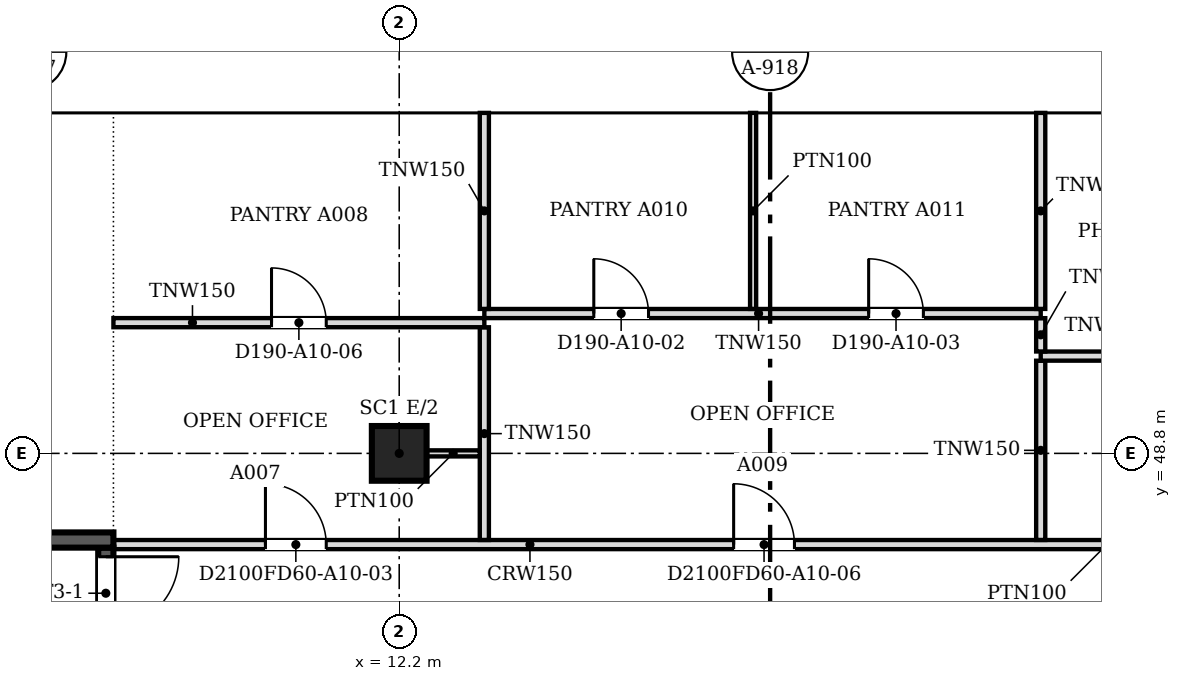
"""IFC4 building model, lengths in metres.
Left out: names, types, materials, properties, quantities, classifications, styles, units other than length and angle.
Written with IfcOpenShell. Run it as: python <this file> out.ifc"""

import sys

from ifc_helpers import new_model, si_unit, direction, frame, frame_2d, origin, origin_2d, place, context, subcontext, project, spatial, polyline, rectangle, outline, extrude, faceted_brep, source, transform, mapped, element, fill, save


model = new_model("IFC4")
c1 = context("Model", 3, precision=1e-05, world=origin(), true_north=direction((0.0, 1.0)))
c2 = subcontext(c1, "Body", "Model", "MODEL_VIEW")
j1 = project(units=[si_unit("LENGTHUNIT", "METRE"), si_unit("PLANEANGLEUNIT", "RADIAN")], contexts=[c1])
p1 = place(None, origin())
s1 = spatial("IfcSite", under=j1, at=p1, CompositionType="ELEMENT")
p2 = place(p1, origin())
s2 = spatial("IfcBuilding", under=s1, at=p2, CompositionType="ELEMENT")
p3 = place(p2, frame((0.0, 0.0, 120.2)))
s3 = spatial("IfcBuildingStorey", under=s2, at=p3, CompositionType="ELEMENT", Elevation=120.2)
p4 = place(p3, frame((12.2, 48.8, 0.0), z_axis=(0.0, 0.0, 1.0), x_axis=(1.0, 0.0, 0.0)))
e1 = element("IfcColumn", 1, at=p4, inside=s3, PredefinedType="COLUMN", context=c2, shape_type="SweptSolid", body=[
    extrude(rectangle(XDim=0.9, YDim=0.9, at=origin_2d()), origin(), (0.0, 0.0, 1.0), 3.6),
])
m1 = source(origin(), c2, "Body", "Brep", [
    faceted_brep([(3.05, -0.25, 0.0), (6.1, -0.25, 3.8), (6.1, -0.25, 3.8), (3.05, -0.25, 7.6), (0.0, -0.25, 3.8), (0.0, 0.25, 3.8), (3.05, 0.25, 7.6), (6.1, 0.25, 3.8), (6.1, 0.25, 3.8), (3.05, 0.25, 0.0)], [[[0, 1, 2, 3, 4]], [[5, 6, 7, 8, 9]], [[9, 8, 1, 0]], [[7, 6, 3, 2]], [[6, 5, 4, 3]], [[5, 9, 0, 4]], [[1, 8, 7, 2]]]),
])
p5 = place(p3, frame((27.45, 54.65, -3.8), z_axis=(0.0, 0.0, 1.0), x_axis=(-1.0, 0.0, 0.0)))
e2 = element("IfcWall", 2, at=p5, inside=s3, PredefinedType="SOLIDWALL", context=c2, shape_type="MappedRepresentation", body=[
    mapped(m1, transform((0.0, 0.0, 0.0), scale=1.0)),
])
m2 = source(origin(), c2, "Body", "SweptSolid", [
    extrude(outline(polyline([(3.05, 0.399), (5.78, 3.8), (3.05, 7.201), (0.321, 3.8), (3.05, 0.399)])), frame((0.0, 0.26, 0.0), z_axis=(0.0, -1.0, 0.0), x_axis=(1.0, 0.0, 0.0)), (0.0, 0.0, 1.0), 0.52),
])
p6 = place(p5, origin())
e3 = element("IfcOpeningElement", 3, at=p6, cuts=e2, PredefinedType="OPENING", context=c2, shape_type="MappedRepresentation", body=[
    mapped(m2, transform((0.0, 0.0, 0.0), scale=1.0)),
])
m3 = source(origin(), c2, "Body", "SweptSolid", [
    extrude(outline(polyline([(3.05, 0.0), (6.1, 3.8), (3.05, 7.6), (0.0, 3.8), (3.05, 0.0)])), frame((0.0, 0.25, 0.0), z_axis=(0.0, -1.0, 0.0), x_axis=(1.0, 0.0, 0.0)), (0.0, 0.0, 1.0), 0.5),
])
p7 = place(p3, frame((21.35, 54.65, -3.8), z_axis=(0.0, 0.0, 1.0), x_axis=(-1.0, 0.0, 0.0)))
e4 = element("IfcWall", 4, at=p7, inside=s3, PredefinedType="SOLIDWALL", context=c2, shape_type="MappedRepresentation", body=[
    mapped(m3, transform((0.0, 0.0, 0.0), scale=1.0)),
])
p8 = place(p7, origin())
e5 = element("IfcOpeningElement", 5, at=p8, cuts=e4, PredefinedType="OPENING", context=c2, shape_type="MappedRepresentation", body=[
    mapped(m2, transform((0.0, 0.0, 0.0), scale=1.0)),
])
p9 = place(p3, frame((15.25, 54.65, -3.8), z_axis=(0.0, 0.0, 1.0), x_axis=(-1.0, 0.0, 0.0)))
e6 = element("IfcWall", 6, at=p9, inside=s3, PredefinedType="SOLIDWALL", context=c2, shape_type="MappedRepresentation", body=[
    mapped(m3, transform((0.0, 0.0, 0.0), scale=1.0)),
])
p10 = place(p9, origin())
e7 = element("IfcOpeningElement", 7, at=p10, cuts=e6, PredefinedType="OPENING", context=c2, shape_type="MappedRepresentation", body=[
    mapped(m2, transform((0.0, 0.0, 0.0), scale=1.0)),
])
m4 = source(origin(), c2, "Body", "Brep", [
    faceted_brep([(3.003, -0.25, 0.0), (3.05, -0.25, 0.06), (3.05, -0.25, 7.54), (3.003, -0.25, 7.6), (0.0, -0.25, 3.8), (0.0, 0.25, 3.8), (2.957, 0.25, 7.541), (2.957, 0.25, 0.059), (3.003, 0.0, 0.0), (3.003, 0.0, 7.6)], [[[0, 1, 2, 3, 4]], [[5, 6, 7]], [[1, 0, 8]], [[9, 3, 2]], [[6, 5, 4, 3, 9]], [[5, 7, 8, 0, 4]], [[1, 8, 7, 6, 9, 2]]]),
])
p11 = place(p3, frame((9.15, 54.65, -3.8), z_axis=(0.0, 0.0, 1.0), x_axis=(-1.0, 0.0, 0.0)))
e8 = element("IfcWall", 8, at=p11, inside=s3, PredefinedType="SOLIDWALL", context=c2, shape_type="MappedRepresentation", body=[
    mapped(m4, transform((0.0, 0.0, 0.0), scale=1.0)),
])
m5 = source(origin(), c2, "Body", "SweptSolid", [
    extrude(outline(polyline([(2.803, 6.944), (0.319, 3.8), (2.803, 0.656), (2.803, 6.944)])), frame((0.0, 0.26, 0.0), z_axis=(0.0, -1.0, 0.0), x_axis=(1.0, 0.0, 0.0)), (0.0, 0.0, 1.0), 0.52),
])
p12 = place(p11, origin())
e9 = element("IfcOpeningElement", 9, at=p12, cuts=e8, PredefinedType="OPENING", context=c2, shape_type="MappedRepresentation", body=[
    mapped(m5, transform((0.0, 0.0, 0.0), scale=1.0)),
])
p13 = place(p2, frame((0.0, 0.0, 124.0)))
s4 = spatial("IfcBuildingStorey", under=s2, at=p13, CompositionType="ELEMENT", Elevation=124.0)
p14 = place(p13, frame((24.4, 54.65, -3.8), z_axis=(0.0, 0.0, 1.0), x_axis=(-1.0, 0.0, 0.0)))
e10 = element("IfcWall", 10, at=p14, inside=s4, PredefinedType="SOLIDWALL", context=c2, shape_type="MappedRepresentation", body=[
    mapped(m1, transform((0.0, 0.0, 0.0), scale=1.0)),
])
p15 = place(p14, origin())
e11 = element("IfcOpeningElement", 11, at=p15, cuts=e10, PredefinedType="OPENING", context=c2, shape_type="MappedRepresentation", body=[
    mapped(m2, transform((0.0, 0.0, 0.0), scale=1.0)),
])
p16 = place(p13, frame((18.3, 54.65, -3.8), z_axis=(0.0, 0.0, 1.0), x_axis=(-1.0, 0.0, 0.0)))
e12 = element("IfcWall", 12, at=p16, inside=s4, PredefinedType="SOLIDWALL", context=c2, shape_type="MappedRepresentation", body=[
    mapped(m3, transform((0.0, 0.0, 0.0), scale=1.0)),
])
p17 = place(p16, origin())
e13 = element("IfcOpeningElement", 13, at=p17, cuts=e12, PredefinedType="OPENING", context=c2, shape_type="MappedRepresentation", body=[
    mapped(m2, transform((0.0, 0.0, 0.0), scale=1.0)),
])
m6 = source(origin(), c2, "Body", "Brep", [
    faceted_brep([(3.05, -0.25, 0.0), (6.053, -0.25, 3.8), (3.05, -0.25, 7.6), (0.0, -0.25, 3.8), (0.0, 0.25, 3.8), (3.05, 0.25, 7.6), (6.007, 0.25, 3.859), (6.007, 0.25, 3.741), (3.05, 0.25, 0.0), (6.053, 0.0, 3.8)], [[[0, 1, 2, 3]], [[4, 5, 6, 7, 8]], [[8, 7, 9, 1, 0]], [[6, 5, 2, 1, 9]], [[5, 4, 3, 2]], [[4, 8, 0, 3]], [[9, 7, 6]]]),
])
p18 = place(p13, frame((12.2, 54.65, -3.8), z_axis=(0.0, 0.0, 1.0), x_axis=(-1.0, 0.0, 0.0)))
e14 = element("IfcWall", 14, at=p18, inside=s4, PredefinedType="SOLIDWALL", context=c2, shape_type="MappedRepresentation", body=[
    mapped(m6, transform((0.0, 0.0, 0.0), scale=1.0)),
])
m7 = source(origin(), c2, "Body", "SweptSolid", [
    extrude(outline(polyline([(3.049, 0.401), (5.735, 3.8), (3.049, 7.199), (0.321, 3.8), (3.049, 0.401)])), frame((0.0, 0.26, 0.0), z_axis=(0.0, -1.0, 0.0), x_axis=(1.0, 0.0, 0.0)), (0.0, 0.0, 1.0), 0.52),
])
p19 = place(p18, origin())
e15 = element("IfcOpeningElement", 15, at=p19, cuts=e14, PredefinedType="OPENING", context=c2, shape_type="MappedRepresentation", body=[
    mapped(m7, transform((0.0, 0.0, 0.0), scale=1.0)),
])
p20 = place(p3, frame((3.6, 47.375, 0.0), z_axis=(0.0, 0.0, 1.0), x_axis=(1.0, 0.0, 0.0)))
e16 = element("IfcWall", 16, at=p20, inside=s3, PredefinedType="SOLIDWALL", context=c2, shape_type="SweptSolid", body=[
    extrude(rectangle(XDim=3.9, YDim=0.25, at=frame_2d((1.95, 0.0))), origin(), (0.0, 0.0, 1.0), 3.8),
])
p21 = place(p3, frame((7.375, 47.25, 0.0), z_axis=(0.0, 0.0, 1.0), x_axis=(0.0, -1.0, 0.0)))
e17 = element("IfcWall", 17, at=p21, inside=s3, PredefinedType="SOLIDWALL", context=c2, shape_type="SweptSolid", body=[
    extrude(rectangle(XDim=8.0, YDim=0.25, at=frame_2d((4.0, 0.0))), origin(), (0.0, 0.0, 1.0), 3.8),
])
m8 = source(origin(), c2, "Body", "SweptSolid", [
    extrude(rectangle(XDim=1.2, YDim=2.1, at=frame_2d((0.6, 1.05))), frame((0.0, 0.135, 0.0), z_axis=(0.0, -1.0, 0.0), x_axis=(1.0, 0.0, 0.0)), (0.0, 0.0, 1.0), 0.27),
])
p22 = place(p21, frame((0.15, 0.0, 0.0)))
e18 = element("IfcOpeningElement", 18, at=p22, cuts=e17, PredefinedType="OPENING", context=c2, shape_type="MappedRepresentation", body=[
    mapped(m8, transform((0.0, 0.0, 0.0), scale=1.0)),
])
p23 = place(p3, frame((7.5, 47.3, 0.0), z_axis=(0.0, 0.0, 1.0), x_axis=(1.0, 0.0, 0.0)))
e19 = element("IfcWall", 19, at=p23, inside=s3, PredefinedType="PARTITIONING", context=c2, shape_type="SweptSolid", body=[
    extrude(rectangle(XDim=20.6, YDim=0.15, at=frame_2d((10.3, 0.0))), origin(), (0.0, 0.0, 1.0), 3.067),
])
m9 = source(origin(), c2, "Body", "SweptSolid", [
    extrude(rectangle(XDim=1.0, YDim=2.1, at=frame_2d((0.5, 1.05))), frame((0.0, 0.085, 0.0), z_axis=(0.0, -1.0, 0.0), x_axis=(1.0, 0.0, 0.0)), (0.0, 0.0, 1.0), 0.17),
])
p24 = place(p23, frame((17.451, 0.0, 0.0)))
e20 = element("IfcOpeningElement", 20, at=p24, cuts=e19, PredefinedType="OPENING", context=c2, shape_type="MappedRepresentation", body=[
    mapped(m9, transform((0.0, 0.0, 0.0), scale=1.0)),
])
p25 = place(p23, frame((2.5, 0.0, 0.0)))
e21 = element("IfcOpeningElement", 21, at=p25, cuts=e19, PredefinedType="OPENING", context=c2, shape_type="MappedRepresentation", body=[
    mapped(m9, transform((0.0, 0.0, 0.0), scale=1.0)),
])
p26 = place(p23, frame((10.2, 0.0, 0.0)))
e22 = element("IfcOpeningElement", 22, at=p26, cuts=e19, PredefinedType="OPENING", context=c2, shape_type="MappedRepresentation", body=[
    mapped(m9, transform((0.0, 0.0, 0.0), scale=1.0)),
])
p27 = place(p3, frame((13.6, 47.376, 0.0), z_axis=(0.0, 0.0, 1.0), x_axis=(0.0, 1.0, 0.0)))
e23 = element("IfcWall", 23, at=p27, inside=s3, PredefinedType="PARTITIONING", context=c2, shape_type="SweptSolid", body=[
    extrude(rectangle(XDim=3.498, YDim=0.15, at=frame_2d((1.749, 0.0))), origin(), (0.0, 0.0, 1.0), 3.067),
])
p28 = place(p3, frame((22.75, 47.376, 0.0), z_axis=(0.0, 0.0, 1.0), x_axis=(0.0, 1.0, 0.0)))
e24 = element("IfcWall", 24, at=p28, inside=s3, PredefinedType="PARTITIONING", context=c2, shape_type="SweptSolid", body=[
    extrude(rectangle(XDim=2.948, YDim=0.15, at=frame_2d((1.474, 0.0))), origin(), (0.0, 0.0, 1.0), 3.067),
])
p29 = place(p3, frame((12.65, 48.8, 0.0), z_axis=(0.0, 0.0, 1.0), x_axis=(1.0, 0.0, 0.0)))
e25 = element("IfcWall", 25, at=p29, inside=s3, PredefinedType="PARTITIONING", context=c2, shape_type="SweptSolid", body=[
    extrude(rectangle(XDim=0.875, YDim=0.1, at=frame_2d((0.438, 0.0))), origin(), (0.0, 0.0, 1.0), 3.067),
])
p30 = place(p3, frame((22.75, 50.4, 0.0), z_axis=(0.0, 0.0, 1.0), x_axis=(1.0, 0.0, 0.0)))
e26 = element("IfcWall", 26, at=p30, inside=s3, PredefinedType="PARTITIONING", context=c2, shape_type="SweptSolid", body=[
    extrude(rectangle(XDim=5.274, YDim=0.15, at=frame_2d((2.637, 0.0))), origin(), (0.0, 0.0, 1.0), 3.067),
])
m10 = source(origin(), c2, "Body", "SweptSolid", [
    extrude(rectangle(XDim=0.9, YDim=2.1, at=frame_2d((0.45, 1.05))), frame((0.0, 0.085, 0.0), z_axis=(0.0, -1.0, 0.0), x_axis=(1.0, 0.0, 0.0)), (0.0, 0.0, 1.0), 0.17),
])
p31 = place(p30, frame((2.2, 0.0, 0.0)))
e27 = element("IfcOpeningElement", 27, at=p31, cuts=e26, PredefinedType="OPENING", context=c2, shape_type="MappedRepresentation", body=[
    mapped(m10, transform((0.0, 0.0, 0.0), scale=1.0)),
])
p32 = place(p3, frame((22.75, 50.476, 0.0), z_axis=(0.0, 0.0, 1.0), x_axis=(0.0, 1.0, 0.0)))
e28 = element("IfcWall", 28, at=p32, inside=s3, PredefinedType="PARTITIONING", context=c2, shape_type="SweptSolid", body=[
    extrude(rectangle(XDim=0.548, YDim=0.15, at=frame_2d((0.274, 0.0))), origin(), (0.0, 0.0, 1.0), 3.067),
])
p33 = place(p3, frame((7.5, 50.95, 0.0), z_axis=(0.0, 0.0, 1.0), x_axis=(1.0, 0.0, 0.0)))
e29 = element("IfcWall", 29, at=p33, inside=s3, PredefinedType="PARTITIONING", context=c2, shape_type="SweptSolid", body=[
    extrude(rectangle(XDim=6.1, YDim=0.15, at=frame_2d((3.05, 0.0))), origin(), (0.0, 0.0, 1.0), 3.067),
])
p34 = place(p33, frame((2.6, 0.0, 0.0)))
e30 = element("IfcOpeningElement", 30, at=p34, cuts=e29, PredefinedType="OPENING", context=c2, shape_type="MappedRepresentation", body=[
    mapped(m10, transform((0.0, 0.0, 0.0), scale=1.0)),
])
p35 = place(p3, frame((13.6, 51.1, 0.0), z_axis=(0.0, 0.0, 1.0), x_axis=(1.0, 0.0, 0.0)))
e31 = element("IfcWall", 31, at=p35, inside=s3, PredefinedType="PARTITIONING", context=c2, shape_type="SweptSolid", body=[
    extrude(rectangle(XDim=9.15, YDim=0.15, at=frame_2d((4.575, 0.0))), origin(), (0.0, 0.0, 1.0), 3.067),
])
p36 = place(p35, frame((1.8, 0.0, 0.0)))
e32 = element("IfcOpeningElement", 32, at=p36, cuts=e31, PredefinedType="OPENING", context=c2, shape_type="MappedRepresentation", body=[
    mapped(m10, transform((0.0, 0.0, 0.0), scale=1.0)),
])
p37 = place(p35, frame((6.32, 0.0, 0.0)))
e33 = element("IfcOpeningElement", 33, at=p37, cuts=e31, PredefinedType="OPENING", context=c2, shape_type="MappedRepresentation", body=[
    mapped(m10, transform((0.0, 0.0, 0.0), scale=1.0)),
])
p38 = place(p3, frame((13.6, 51.176, 0.0), z_axis=(0.0, 0.0, 1.0), x_axis=(0.0, 1.0, 0.0)))
e34 = element("IfcWall", 34, at=p38, inside=s3, PredefinedType="PARTITIONING", context=c2, shape_type="SweptSolid", body=[
    extrude(rectangle(XDim=3.224, YDim=0.15, at=frame_2d((1.612, 0.0))), origin(), (0.0, 0.0, 1.0), 3.067),
])
p39 = place(p3, frame((18.02, 51.176, 0.0), z_axis=(0.0, 0.0, 1.0), x_axis=(0.0, 1.0, 0.0)))
e35 = element("IfcWall", 35, at=p39, inside=s3, PredefinedType="PARTITIONING", context=c2, shape_type="SweptSolid", body=[
    extrude(rectangle(XDim=3.224, YDim=0.1, at=frame_2d((1.612, 0.0))), origin(), (0.0, 0.0, 1.0), 3.067),
])
p40 = place(p3, frame((22.75, 51.176, 0.0), z_axis=(0.0, 0.0, 1.0), x_axis=(0.0, 1.0, 0.0)))
e36 = element("IfcWall", 36, at=p40, inside=s3, PredefinedType="PARTITIONING", context=c2, shape_type="SweptSolid", body=[
    extrude(rectangle(XDim=3.224, YDim=0.15, at=frame_2d((1.612, 0.0))), origin(), (0.0, 0.0, 1.0), 3.067),
])
m11 = source(origin(), c2, "Body", "SweptSolid", [
    extrude(rectangle(XDim=1.2, YDim=2.1, at=frame_2d((0.6, 1.05))), frame((0.0, 0.025, 0.0), z_axis=(0.0, -1.0, 0.0), x_axis=(1.0, 0.0, 0.0)), (0.0, 0.0, 1.0), 0.05),
])
p41 = place(p22, origin())
e37 = element("IfcDoor", 37, at=p41, inside=s3, OperationType="SINGLE_SWING_LEFT", PredefinedType="DOOR", context=c2, shape_type="MappedRepresentation", body=[
    mapped(m11, transform((0.0, 0.0, 0.0), scale=1.0)),
])
fill(e18, e37)
m12 = source(origin(), c2, "Body", "SweptSolid", [
    extrude(rectangle(XDim=0.9, YDim=2.1, at=frame_2d((0.45, 1.05))), frame((0.0, 0.025, 0.0), z_axis=(0.0, -1.0, 0.0), x_axis=(1.0, 0.0, 0.0)), (0.0, 0.0, 1.0), 0.05),
])
p42 = place(p36, origin())
e38 = element("IfcDoor", 38, at=p42, inside=s3, OperationType="SINGLE_SWING_LEFT", PredefinedType="DOOR", context=c2, shape_type="MappedRepresentation", body=[
    mapped(m12, transform((0.0, 0.0, 0.0), scale=1.0)),
])
fill(e32, e38)
p43 = place(p37, origin())
e39 = element("IfcDoor", 39, at=p43, inside=s3, OperationType="SINGLE_SWING_LEFT", PredefinedType="DOOR", context=c2, shape_type="MappedRepresentation", body=[
    mapped(m12, transform((0.0, 0.0, 0.0), scale=1.0)),
])
fill(e33, e39)
m13 = source(origin(), c2, "Body", "SweptSolid", [
    extrude(rectangle(XDim=1.0, YDim=2.1, at=frame_2d((0.5, 1.05))), frame((0.0, 0.025, 0.0), z_axis=(0.0, -1.0, 0.0), x_axis=(1.0, 0.0, 0.0)), (0.0, 0.0, 1.0), 0.05),
])
p44 = place(p25, origin())
e40 = element("IfcDoor", 40, at=p44, inside=s3, OperationType="SINGLE_SWING_LEFT", PredefinedType="DOOR", context=c2, shape_type="MappedRepresentation", body=[
    mapped(m13, transform((0.0, 0.0, 0.0), scale=1.0)),
])
fill(e21, e40)
p45 = place(p34, origin())
e41 = element("IfcDoor", 41, at=p45, inside=s3, OperationType="SINGLE_SWING_LEFT", PredefinedType="DOOR", context=c2, shape_type="MappedRepresentation", body=[
    mapped(m12, transform((0.0, 0.0, 0.0), scale=1.0)),
])
fill(e30, e41)
p46 = place(p26, origin())
e42 = element("IfcDoor", 42, at=p46, inside=s3, OperationType="SINGLE_SWING_LEFT", PredefinedType="DOOR", context=c2, shape_type="MappedRepresentation", body=[
    mapped(m13, transform((0.0, 0.0, 0.0), scale=1.0)),
])
fill(e22, e42)
save(model, sys.argv[1])
